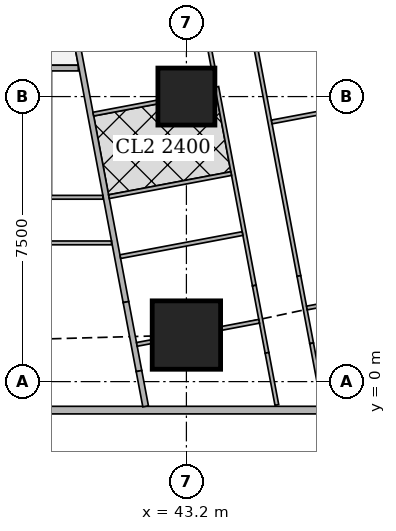
"""IFC4 building model, lengths in metres.
Left out: names, types, materials, properties, quantities, classifications, styles, units other than length and angle.
Written with IfcOpenShell. Run it as: python <this file> out.ifc"""

import sys

from ifc_helpers import new_model, si_unit, direction, frame, frame_2d, origin, origin_2d, place, context, subcontext, project, spatial, rectangle, extrude, element, fill, save


model = new_model("IFC4")
c1 = context("Model", 3, precision=1e-05, world=origin(), true_north=direction((0.0, 1.0)))
c2 = subcontext(c1, "Body", "Model", "MODEL_VIEW")
j1 = project(units=[si_unit("LENGTHUNIT", "METRE"), si_unit("PLANEANGLEUNIT", "RADIAN")], contexts=[c1])
p1 = place(None, origin())
s1 = spatial("IfcSite", under=j1, at=p1, CompositionType="ELEMENT")
p2 = place(p1, origin())
s2 = spatial("IfcBuilding", under=s1, at=p2, CompositionType="ELEMENT")
p3 = place(p2, frame((0.0, 0.0, 169.55)))
s3 = spatial("IfcBuildingStorey", under=s2, at=p3, CompositionType="ELEMENT", Elevation=169.55)
p4 = place(p3, frame((43.2, 1.225, 0.0), z_axis=(0.0, 0.0, 1.0), x_axis=(1.0, 0.0, 0.0)))
e1 = element("IfcColumn", 1, at=p4, inside=s3, PredefinedType="COLUMN", context=c2, shape_type="SweptSolid", body=[
    extrude(rectangle(XDim=1.8, YDim=1.8, at=origin_2d()), origin(), (0.0, 0.0, 1.0), 3.75),
])
p5 = place(p3, frame((43.2, 7.5, 0.0), z_axis=(0.0, 0.0, 1.0), x_axis=(1.0, 0.0, 0.0)))
e2 = element("IfcColumn", 2, at=p5, inside=s3, PredefinedType="COLUMN", context=c2, shape_type="SweptSolid", body=[
    extrude(rectangle(XDim=1.5, YDim=1.5, at=origin_2d()), origin(), (0.0, 0.0, 1.0), 3.75),
])
p6 = place(p3, frame((2.163, -0.75, 0.0), z_axis=(0.0, 0.0, 1.0), x_axis=(1.0, 0.0, 0.0)))
e3 = element("IfcWall", 3, at=p6, inside=s3, PredefinedType="SOLIDWALL", context=c2, shape_type="SweptSolid", body=[
    extrude(rectangle(XDim=45.628, YDim=0.2, at=frame_2d((22.814, 0.0))), origin(), (0.0, 0.0, 1.0), 3.5),
])
p7 = place(p6, frame((9.537, 0.0, 0.9)))
e4 = element("IfcOpeningElement", 4, at=p7, cuts=e3, PredefinedType="OPENING", context=c2, shape_type="SweptSolid", body=[
    extrude(rectangle(XDim=1.8, YDim=1.5, at=frame_2d((0.9, 0.75))), frame((0.0, 0.11, 0.0), z_axis=(0.0, -1.0, 0.0), x_axis=(1.0, 0.0, 0.0)), (0.0, 0.0, 1.0), 0.22),
])
p8 = place(p6, frame((13.137, 0.0, 0.9)))
e5 = element("IfcOpeningElement", 5, at=p8, cuts=e3, PredefinedType="OPENING", context=c2, shape_type="SweptSolid", body=[
    extrude(rectangle(XDim=1.8, YDim=1.5, at=frame_2d((0.9, 0.75))), frame((0.0, 0.11, 0.0), z_axis=(0.0, -1.0, 0.0), x_axis=(1.0, 0.0, 0.0)), (0.0, 0.0, 1.0), 0.22),
])
p9 = place(p6, frame((16.737, 0.0, 0.9)))
e6 = element("IfcOpeningElement", 6, at=p9, cuts=e3, PredefinedType="OPENING", context=c2, shape_type="SweptSolid", body=[
    extrude(rectangle(XDim=1.8, YDim=1.5, at=frame_2d((0.9, 0.75))), frame((0.0, 0.11, 0.0), z_axis=(0.0, -1.0, 0.0), x_axis=(1.0, 0.0, 0.0)), (0.0, 0.0, 1.0), 0.22),
])
p10 = place(p6, frame((20.337, 0.0, 0.9)))
e7 = element("IfcOpeningElement", 7, at=p10, cuts=e3, PredefinedType="OPENING", context=c2, shape_type="SweptSolid", body=[
    extrude(rectangle(XDim=1.8, YDim=1.5, at=frame_2d((0.9, 0.75))), frame((0.0, 0.11, 0.0), z_axis=(0.0, -1.0, 0.0), x_axis=(1.0, 0.0, 0.0)), (0.0, 0.0, 1.0), 0.22),
])
p11 = place(p6, frame((23.937, 0.0, 0.9)))
e8 = element("IfcOpeningElement", 8, at=p11, cuts=e3, PredefinedType="OPENING", context=c2, shape_type="SweptSolid", body=[
    extrude(rectangle(XDim=1.8, YDim=1.5, at=frame_2d((0.9, 0.75))), frame((0.0, 0.11, 0.0), z_axis=(0.0, -1.0, 0.0), x_axis=(1.0, 0.0, 0.0)), (0.0, 0.0, 1.0), 0.22),
])
p12 = place(p6, frame((27.537, 0.0, 0.9)))
e9 = element("IfcOpeningElement", 9, at=p12, cuts=e3, PredefinedType="OPENING", context=c2, shape_type="SweptSolid", body=[
    extrude(rectangle(XDim=1.8, YDim=1.5, at=frame_2d((0.9, 0.75))), frame((0.0, 0.11, 0.0), z_axis=(0.0, -1.0, 0.0), x_axis=(1.0, 0.0, 0.0)), (0.0, 0.0, 1.0), 0.22),
])
p13 = place(p6, frame((31.137, 0.0, 0.9)))
e10 = element("IfcOpeningElement", 10, at=p13, cuts=e3, PredefinedType="OPENING", context=c2, shape_type="SweptSolid", body=[
    extrude(rectangle(XDim=1.8, YDim=1.5, at=frame_2d((0.9, 0.75))), frame((0.0, 0.11, 0.0), z_axis=(0.0, -1.0, 0.0), x_axis=(1.0, 0.0, 0.0)), (0.0, 0.0, 1.0), 0.22),
])
p14 = place(p6, frame((34.737, 0.0, 0.9)))
e11 = element("IfcOpeningElement", 11, at=p14, cuts=e3, PredefinedType="OPENING", context=c2, shape_type="SweptSolid", body=[
    extrude(rectangle(XDim=1.8, YDim=1.5, at=frame_2d((0.9, 0.75))), frame((0.0, 0.11, 0.0), z_axis=(0.0, -1.0, 0.0), x_axis=(1.0, 0.0, 0.0)), (0.0, 0.0, 1.0), 0.22),
])
p15 = place(p3, frame((50.653, 2.703, 0.0), z_axis=(0.0, 0.0, 1.0), x_axis=(-0.185612026696, 0.982623109613, 0.0)))
e12 = element("IfcWall", 12, at=p15, inside=s3, PredefinedType="SOLIDWALL", context=c2, shape_type="SweptSolid", body=[
    extrude(rectangle(XDim=41.393, YDim=0.2, at=frame_2d((20.697, 0.0))), origin(), (0.0, 0.0, 1.0), 3.5),
])
p16 = place(p15, frame((1.633, 0.0, 0.9)))
e13 = element("IfcOpeningElement", 13, at=p16, cuts=e12, PredefinedType="OPENING", context=c2, shape_type="SweptSolid", body=[
    extrude(rectangle(XDim=1.8, YDim=1.5, at=frame_2d((0.9, 0.75))), frame((0.0, 0.11, 0.0), z_axis=(0.0, -1.0, 0.0), x_axis=(1.0, 0.0, 0.0)), (0.0, 0.0, 1.0), 0.22),
])
p17 = place(p15, frame((6.032, 0.0, 0.9)))
e14 = element("IfcOpeningElement", 14, at=p17, cuts=e12, PredefinedType="OPENING", context=c2, shape_type="SweptSolid", body=[
    extrude(rectangle(XDim=1.8, YDim=1.5, at=frame_2d((0.9, 0.75))), frame((0.0, 0.11, 0.0), z_axis=(0.0, -1.0, 0.0), x_axis=(1.0, 0.0, 0.0)), (0.0, 0.0, 1.0), 0.22),
])
p18 = place(p15, frame((9.848, 0.0, 0.9)))
e15 = element("IfcOpeningElement", 15, at=p18, cuts=e12, PredefinedType="OPENING", context=c2, shape_type="SweptSolid", body=[
    extrude(rectangle(XDim=1.8, YDim=1.5, at=frame_2d((0.9, 0.75))), frame((0.0, 0.11, 0.0), z_axis=(0.0, -1.0, 0.0), x_axis=(1.0, 0.0, 0.0)), (0.0, 0.0, 1.0), 0.22),
])
p19 = place(p15, frame((13.664, 0.0, 0.9)))
e16 = element("IfcOpeningElement", 16, at=p19, cuts=e12, PredefinedType="OPENING", context=c2, shape_type="SweptSolid", body=[
    extrude(rectangle(XDim=1.8, YDim=1.5, at=frame_2d((0.9, 0.75))), frame((0.0, 0.11, 0.0), z_axis=(0.0, -1.0, 0.0), x_axis=(1.0, 0.0, 0.0)), (0.0, 0.0, 1.0), 0.22),
])
p20 = place(p15, frame((17.481, 0.0, 0.9)))
e17 = element("IfcOpeningElement", 17, at=p20, cuts=e12, PredefinedType="OPENING", context=c2, shape_type="SweptSolid", body=[
    extrude(rectangle(XDim=1.8, YDim=1.5, at=frame_2d((0.9, 0.75))), frame((0.0, 0.11, 0.0), z_axis=(0.0, -1.0, 0.0), x_axis=(1.0, 0.0, 0.0)), (0.0, 0.0, 1.0), 0.22),
])
p21 = place(p15, frame((21.297, 0.0, 0.9)))
e18 = element("IfcOpeningElement", 18, at=p21, cuts=e12, PredefinedType="OPENING", context=c2, shape_type="SweptSolid", body=[
    extrude(rectangle(XDim=1.8, YDim=1.5, at=frame_2d((0.9, 0.75))), frame((0.0, 0.11, 0.0), z_axis=(0.0, -1.0, 0.0), x_axis=(1.0, 0.0, 0.0)), (0.0, 0.0, 1.0), 0.22),
])
p22 = place(p15, frame((25.113, 0.0, 0.9)))
e19 = element("IfcOpeningElement", 19, at=p22, cuts=e12, PredefinedType="OPENING", context=c2, shape_type="SweptSolid", body=[
    extrude(rectangle(XDim=1.8, YDim=1.5, at=frame_2d((0.9, 0.75))), frame((0.0, 0.11, 0.0), z_axis=(0.0, -1.0, 0.0), x_axis=(1.0, 0.0, 0.0)), (0.0, 0.0, 1.0), 0.22),
])
p23 = place(p15, frame((28.93, 0.0, 0.9)))
e20 = element("IfcOpeningElement", 20, at=p23, cuts=e12, PredefinedType="OPENING", context=c2, shape_type="SweptSolid", body=[
    extrude(rectangle(XDim=1.8, YDim=1.5, at=frame_2d((0.9, 0.75))), frame((0.0, 0.11, 0.0), z_axis=(0.0, -1.0, 0.0), x_axis=(1.0, 0.0, 0.0)), (0.0, 0.0, 1.0), 0.22),
])
p24 = place(p15, frame((32.746, 0.0, 0.9)))
e21 = element("IfcOpeningElement", 21, at=p24, cuts=e12, PredefinedType="OPENING", context=c2, shape_type="SweptSolid", body=[
    extrude(rectangle(XDim=1.8, YDim=1.5, at=frame_2d((0.9, 0.75))), frame((0.0, 0.11, 0.0), z_axis=(0.0, -1.0, 0.0), x_axis=(1.0, 0.0, 0.0)), (0.0, 0.0, 1.0), 0.22),
])
p25 = place(p15, frame((36.481, 0.0, 0.9)))
e22 = element("IfcOpeningElement", 22, at=p25, cuts=e12, PredefinedType="OPENING", context=c2, shape_type="SweptSolid", body=[
    extrude(rectangle(XDim=1.8, YDim=1.5, at=frame_2d((0.9, 0.75))), frame((0.0, 0.11, 0.0), z_axis=(0.0, -1.0, 0.0), x_axis=(1.0, 0.0, 0.0)), (0.0, 0.0, 1.0), 0.22),
])
p26 = place(p3, frame((40.356, 8.25, 0.0), z_axis=(0.0, 0.0, 1.0), x_axis=(-1.0, 0.0, 0.0)))
e23 = element("IfcWall", 23, at=p26, inside=s3, PredefinedType="SOLIDWALL", context=c2, shape_type="SweptSolid", body=[
    extrude(rectangle(XDim=3.605, YDim=0.15, at=frame_2d((1.802, 0.0))), origin(), (0.0, 0.0, 1.0), 3.5),
])
p27 = place(p3, frame((33.877, 43.029, 0.0), z_axis=(0.0, 0.0, 1.0), x_axis=(0.185596841028, -0.98262597798, 0.0)))
e24 = element("IfcWall", 24, at=p27, inside=s3, PredefinedType="SOLIDWALL", context=c2, shape_type="SweptSolid", body=[
    extrude(rectangle(XDim=41.66, YDim=0.15, at=frame_2d((20.83, 0.0))), origin(), (0.0, 0.0, 1.0), 2.5),
])
p28 = place(p27, frame((8.63, 0.0, 0.0)))
e25 = element("IfcOpeningElement", 25, at=p28, cuts=e24, PredefinedType="OPENING", context=c2, shape_type="SweptSolid", body=[
    extrude(rectangle(XDim=1.0, YDim=2.1, at=frame_2d((0.5, 1.05))), frame((0.0, 0.085, 0.0), z_axis=(0.0, -1.0, 0.0), x_axis=(1.0, 0.0, 0.0)), (0.0, 0.0, 1.0), 0.17),
])
p29 = place(p27, frame((13.841, 0.0, 0.0)))
e26 = element("IfcOpeningElement", 26, at=p29, cuts=e24, PredefinedType="OPENING", context=c2, shape_type="SweptSolid", body=[
    extrude(rectangle(XDim=1.0, YDim=2.1, at=frame_2d((0.5, 1.05))), frame((0.0, 0.085, 0.0), z_axis=(0.0, -1.0, 0.0), x_axis=(1.0, 0.0, 0.0)), (0.0, 0.0, 1.0), 0.17),
])
p30 = place(p27, frame((21.474, 0.0, 0.0)))
e27 = element("IfcOpeningElement", 27, at=p30, cuts=e24, PredefinedType="OPENING", context=c2, shape_type="SweptSolid", body=[
    extrude(rectangle(XDim=1.0, YDim=2.1, at=frame_2d((0.5, 1.05))), frame((0.0, 0.085, 0.0), z_axis=(0.0, -1.0, 0.0), x_axis=(1.0, 0.0, 0.0)), (0.0, 0.0, 1.0), 0.17),
])
p31 = place(p27, frame((30.4, 0.0, 0.0)))
e28 = element("IfcOpeningElement", 28, at=p31, cuts=e24, PredefinedType="OPENING", context=c2, shape_type="SweptSolid", body=[
    extrude(rectangle(XDim=1.0, YDim=2.1, at=frame_2d((0.5, 1.05))), frame((0.0, 0.085, 0.0), z_axis=(0.0, -1.0, 0.0), x_axis=(1.0, 0.0, 0.0)), (0.0, 0.0, 1.0), 0.17),
])
p32 = place(p27, frame((32.288, 0.0, 0.0)))
e29 = element("IfcOpeningElement", 29, at=p32, cuts=e24, PredefinedType="OPENING", context=c2, shape_type="SweptSolid", body=[
    extrude(rectangle(XDim=1.0, YDim=2.1, at=frame_2d((0.5, 1.05))), frame((0.0, 0.085, 0.0), z_axis=(0.0, -1.0, 0.0), x_axis=(1.0, 0.0, 0.0)), (0.0, 0.0, 1.0), 0.17),
])
p33 = place(p3, frame((41.609, 2.093, 0.0), z_axis=(0.0, 0.0, 1.0), x_axis=(0.185708872674, -0.982604811005, 0.0)))
e30 = element("IfcWall", 30, at=p33, inside=s3, PredefinedType="SOLIDWALL", context=c2, shape_type="SweptSolid", body=[
    extrude(rectangle(XDim=1.847, YDim=0.15, at=frame_2d((0.924, 0.0))), origin(), (0.0, 0.0, 1.0), 2.1),
])
p34 = place(p3, frame((41.952, 0.278, 0.0), z_axis=(0.0, 0.0, 1.0), x_axis=(0.185365466984, -0.982669651332, 0.0)))
e31 = element("IfcWall", 31, at=p34, inside=s3, PredefinedType="SOLIDWALL", context=c2, shape_type="SweptSolid", body=[
    extrude(rectangle(XDim=0.944, YDim=0.15, at=frame_2d((0.472, 0.0))), origin(), (0.0, 0.0, 1.0), 3.5),
])
p35 = place(p3, frame((41.229, 3.65, 0.0), z_axis=(0.0, 0.0, 1.0), x_axis=(-1.0, 0.0, 0.0)))
e32 = element("IfcWall", 32, at=p35, inside=s3, PredefinedType="PARTITIONING", context=c2, shape_type="SweptSolid", body=[
    extrude(rectangle(XDim=8.829, YDim=0.1, at=frame_2d((4.415, 0.0))), origin(), (0.0, 0.0, 1.0), 3.5),
])
p36 = place(p35, frame((6.53, 0.0, 0.0)))
e33 = element("IfcOpeningElement", 33, at=p36, cuts=e32, PredefinedType="OPENING", context=c2, shape_type="SweptSolid", body=[
    extrude(rectangle(XDim=0.9, YDim=2.1, at=frame_2d((0.45, 1.05))), frame((0.0, 0.06, 0.0), z_axis=(0.0, -1.0, 0.0), x_axis=(1.0, 0.0, 0.0)), (0.0, 0.0, 1.0), 0.12),
])
p37 = place(p35, frame((4.129, 0.0, 0.0)))
e34 = element("IfcOpeningElement", 34, at=p37, cuts=e32, PredefinedType="OPENING", context=c2, shape_type="SweptSolid", body=[
    extrude(rectangle(XDim=0.9, YDim=2.1, at=frame_2d((0.45, 1.05))), frame((0.0, 0.06, 0.0), z_axis=(0.0, -1.0, 0.0), x_axis=(1.0, 0.0, 0.0)), (0.0, 0.0, 1.0), 0.12),
])
p38 = place(p3, frame((41.002, 4.85, 0.0), z_axis=(0.0, 0.0, 1.0), x_axis=(-1.0, 0.0, 0.0)))
e35 = element("IfcWall", 35, at=p38, inside=s3, PredefinedType="PARTITIONING", context=c2, shape_type="SweptSolid", body=[
    extrude(rectangle(XDim=7.403, YDim=0.1, at=frame_2d((3.701, 0.0))), origin(), (0.0, 0.0, 1.0), 3.5),
])
p39 = place(p38, frame((5.753, 0.0, 0.0)))
e36 = element("IfcOpeningElement", 36, at=p39, cuts=e35, PredefinedType="OPENING", context=c2, shape_type="SweptSolid", body=[
    extrude(rectangle(XDim=0.9, YDim=2.1, at=frame_2d((0.45, 1.05))), frame((0.0, 0.06, 0.0), z_axis=(0.0, -1.0, 0.0), x_axis=(1.0, 0.0, 0.0)), (0.0, 0.0, 1.0), 0.12),
])
p40 = place(p38, frame((3.447, 0.0, 0.0)))
e37 = element("IfcOpeningElement", 37, at=p40, cuts=e35, PredefinedType="OPENING", context=c2, shape_type="SweptSolid", body=[
    extrude(rectangle(XDim=0.9, YDim=2.1, at=frame_2d((0.45, 1.05))), frame((0.0, 0.06, 0.0), z_axis=(0.0, -1.0, 0.0), x_axis=(1.0, 0.0, 0.0)), (0.0, 0.0, 1.0), 0.12),
])
p41 = place(p38, frame((0.15, 0.0, 0.0)))
e38 = element("IfcOpeningElement", 38, at=p41, cuts=e35, PredefinedType="OPENING", context=c2, shape_type="SweptSolid", body=[
    extrude(rectangle(XDim=0.9, YDim=2.1, at=frame_2d((0.45, 1.05))), frame((0.0, 0.06, 0.0), z_axis=(0.0, -1.0, 0.0), x_axis=(1.0, 0.0, 0.0)), (0.0, 0.0, 1.0), 0.12),
])
p42 = place(p38, frame((1.647, 0.0, 0.0)))
e39 = element("IfcOpeningElement", 39, at=p42, cuts=e35, PredefinedType="OPENING", context=c2, shape_type="SweptSolid", body=[
    extrude(rectangle(XDim=0.9, YDim=2.1, at=frame_2d((0.45, 1.05))), frame((0.0, 0.06, 0.0), z_axis=(0.0, -1.0, 0.0), x_axis=(1.0, 0.0, 0.0)), (0.0, 0.0, 1.0), 0.12),
])
p43 = place(p3, frame((44.727, 10.366, 0.0), z_axis=(0.0, 0.0, 1.0), x_axis=(0.185578957652, -0.982629355595, 0.0)))
e40 = element("IfcWall", 40, at=p43, inside=s3, PredefinedType="PARTITIONING", context=c2, shape_type="SweptSolid", body=[
    extrude(rectangle(XDim=7.721, YDim=0.1, at=frame_2d((3.86, 0.0))), origin(), (0.0, 0.0, 1.0), 3.5),
])
p44 = place(p43, frame((0.151, 0.0, 0.0)))
e41 = element("IfcOpeningElement", 41, at=p44, cuts=e40, PredefinedType="OPENING", context=c2, shape_type="SweptSolid", body=[
    extrude(rectangle(XDim=0.9, YDim=2.1, at=frame_2d((0.45, 1.05))), frame((0.0, 0.06, 0.0), z_axis=(0.0, -1.0, 0.0), x_axis=(1.0, 0.0, 0.0)), (0.0, 0.0, 1.0), 0.12),
])
p45 = place(p43, frame((3.806, 0.0, 0.0)))
e42 = element("IfcOpeningElement", 42, at=p45, cuts=e40, PredefinedType="OPENING", context=c2, shape_type="SweptSolid", body=[
    extrude(rectangle(XDim=0.9, YDim=2.1, at=frame_2d((0.45, 1.05))), frame((0.0, 0.06, 0.0), z_axis=(0.0, -1.0, 0.0), x_axis=(1.0, 0.0, 0.0)), (0.0, 0.0, 1.0), 0.12),
])
p46 = place(p3, frame((46.16, 2.779, 0.0), z_axis=(0.0, 0.0, 1.0), x_axis=(0.18597295662, -0.982554863306, 0.0)))
e43 = element("IfcWall", 43, at=p46, inside=s3, PredefinedType="PARTITIONING", context=c2, shape_type="SweptSolid", body=[
    extrude(rectangle(XDim=1.802, YDim=0.1, at=frame_2d((0.901, 0.0))), origin(), (0.0, 0.0, 1.0), 2.1),
])
p47 = place(p3, frame((46.495, 1.008, 0.0), z_axis=(0.0, 0.0, 1.0), x_axis=(0.185535059532, -0.982637645159, 0.0)))
e44 = element("IfcWall", 44, at=p47, inside=s3, PredefinedType="PARTITIONING", context=c2, shape_type="SweptSolid", body=[
    extrude(rectangle(XDim=1.644, YDim=0.1, at=frame_2d((0.822, 0.0))), origin(), (0.0, 0.0, 1.0), 3.5),
])
p48 = place(p3, frame((43.539, 10.192, 0.0), z_axis=(0.0, 0.0, 1.0), x_axis=(0.18564540894, -0.982616803306, 0.0)))
e45 = element("IfcWall", 45, at=p48, inside=s3, PredefinedType="PARTITIONING", context=c2, shape_type="SweptSolid", body=[
    extrude(rectangle(XDim=1.966, YDim=0.1, at=frame_2d((0.983, 0.0))), origin(), (0.0, 0.0, 1.0), 3.5),
])
p49 = place(p3, frame((43.999, 7.755, 0.0), z_axis=(0.0, 0.0, 1.0), x_axis=(0.185565904578, -0.982631820703, 0.0)))
e46 = element("IfcWall", 46, at=p49, inside=s3, PredefinedType="PARTITIONING", context=c2, shape_type="SweptSolid", body=[
    extrude(rectangle(XDim=5.319, YDim=0.1, at=frame_2d((2.66, 0.0))), origin(), (0.0, 0.0, 1.0), 3.5),
])
p50 = place(p49, frame((1.0, 0.0, 0.0)))
e47 = element("IfcOpeningElement", 47, at=p50, cuts=e46, PredefinedType="OPENING", context=c2, shape_type="SweptSolid", body=[
    extrude(rectangle(XDim=0.9, YDim=2.1, at=frame_2d((0.45, 1.05))), frame((0.0, 0.06, 0.0), z_axis=(0.0, -1.0, 0.0), x_axis=(1.0, 0.0, 0.0)), (0.0, 0.0, 1.0), 0.12),
])
p51 = place(p49, frame((4.269, 0.0, 0.0)))
e48 = element("IfcOpeningElement", 48, at=p51, cuts=e46, PredefinedType="OPENING", context=c2, shape_type="SweptSolid", body=[
    extrude(rectangle(XDim=0.9, YDim=2.1, at=frame_2d((0.45, 1.05))), frame((0.0, 0.06, 0.0), z_axis=(0.0, -1.0, 0.0), x_axis=(1.0, 0.0, 0.0)), (0.0, 0.0, 1.0), 0.12),
])
p52 = place(p49, frame((2.665, 0.0, 0.0)))
e49 = element("IfcOpeningElement", 49, at=p52, cuts=e46, PredefinedType="OPENING", context=c2, shape_type="SweptSolid", body=[
    extrude(rectangle(XDim=0.9, YDim=2.1, at=frame_2d((0.45, 1.05))), frame((0.0, 0.06, 0.0), z_axis=(0.0, -1.0, 0.0), x_axis=(1.0, 0.0, 0.0)), (0.0, 0.0, 1.0), 0.12),
])
p53 = place(p3, frame((44.986, 2.528, 0.0), z_axis=(0.0, 0.0, 1.0), x_axis=(0.18584218627, -0.982579605835, 0.0)))
e50 = element("IfcWall", 50, at=p53, inside=s3, PredefinedType="PARTITIONING", context=c2, shape_type="SweptSolid", body=[
    extrude(rectangle(XDim=1.802, YDim=0.1, at=frame_2d((0.901, 0.0))), origin(), (0.0, 0.0, 1.0), 2.1),
])
p54 = place(p3, frame((45.321, 0.757, 0.0), z_axis=(0.0, 0.0, 1.0), x_axis=(0.185640562635, -0.982617718904, 0.0)))
e51 = element("IfcWall", 51, at=p54, inside=s3, PredefinedType="PARTITIONING", context=c2, shape_type="SweptSolid", body=[
    extrude(rectangle(XDim=1.395, YDim=0.1, at=frame_2d((0.698, 0.0))), origin(), (0.0, 0.0, 1.0), 3.5),
])
p55 = place(p54, frame((0.15, 0.0, 0.0)))
e52 = element("IfcOpeningElement", 52, at=p55, cuts=e51, PredefinedType="OPENING", context=c2, shape_type="SweptSolid", body=[
    extrude(rectangle(XDim=0.9, YDim=2.1, at=frame_2d((0.45, 1.05))), frame((0.0, 0.06, 0.0), z_axis=(0.0, -1.0, 0.0), x_axis=(1.0, 0.0, 0.0)), (0.0, 0.0, 1.0), 0.12),
])
p56 = place(p3, frame((46.82, 7.091, 0.0), z_axis=(0.0, 0.0, 1.0), x_axis=(-0.982689853246, -0.185258339427, 0.0)))
e53 = element("IfcWall", 53, at=p56, inside=s3, PredefinedType="PARTITIONING", context=c2, shape_type="SweptSolid", body=[
    extrude(rectangle(XDim=1.398, YDim=0.1, at=frame_2d((0.699, 0.0))), origin(), (0.0, 0.0, 1.0), 3.5),
])
p57 = place(p3, frame((46.738, 2.006, 0.0), z_axis=(0.0, 0.0, 1.0), x_axis=(-0.982820466874, -0.184564161994, 0.0)))
e54 = element("IfcWall", 54, at=p57, inside=s3, PredefinedType="PARTITIONING", context=c2, shape_type="SweptSolid", body=[
    extrude(rectangle(XDim=0.374, YDim=0.1, at=frame_2d((0.187, 0.0))), origin(), (0.0, 0.0, 1.0), 2.1),
])
p58 = place(p3, frame((42.44, 7.357, 0.0), z_axis=(0.0, 0.0, 1.0), x_axis=(-0.982643094077, -0.185506198448, 0.0)))
e55 = element("IfcWall", 55, at=p58, inside=s3, PredefinedType="PARTITIONING", context=c2, shape_type="SweptSolid", body=[
    extrude(rectangle(XDim=1.719, YDim=0.1, at=frame_2d((0.859, 0.0))), origin(), (0.0, 0.0, 1.0), 3.5),
])
p59 = place(p3, frame((45.114, 1.587, 0.0), z_axis=(0.0, 0.0, 1.0), x_axis=(-0.982567886437, -0.185904138047, 0.0)))
e56 = element("IfcWall", 56, at=p59, inside=s3, PredefinedType="PARTITIONING", context=c2, shape_type="SweptSolid", body=[
    extrude(rectangle(XDim=1.022, YDim=0.1, at=frame_2d((0.511, 0.0))), origin(), (0.0, 0.0, 1.0), 2.1),
])
p60 = place(p3, frame((42.29, 1.053, 0.0), z_axis=(0.0, 0.0, 1.0), x_axis=(-0.982830800147, -0.184509127909, 0.0)))
e57 = element("IfcWall", 57, at=p60, inside=s3, PredefinedType="PARTITIONING", context=c2, shape_type="SweptSolid", body=[
    extrude(rectangle(XDim=0.401, YDim=0.1, at=frame_2d((0.2, 0.0))), origin(), (0.0, 0.0, 1.0), 2.1),
])
p61 = place(p3, frame((44.677, 3.896, 0.0), z_axis=(0.0, 0.0, 1.0), x_axis=(-0.982610347627, -0.185679575441, 0.0)))
e58 = element("IfcWall", 58, at=p61, inside=s3, PredefinedType="PARTITIONING", context=c2, shape_type="SweptSolid", body=[
    extrude(rectangle(XDim=3.274, YDim=0.1, at=frame_2d((1.637, 0.0))), origin(), (0.0, 0.0, 1.0), 3.5),
])
p62 = place(p3, frame((44.379, 5.474, 0.0), z_axis=(0.0, 0.0, 1.0), x_axis=(-0.982607026909, -0.185697147715, 0.0)))
e59 = element("IfcWall", 59, at=p62, inside=s3, PredefinedType="PARTITIONING", context=c2, shape_type="SweptSolid", body=[
    extrude(rectangle(XDim=3.275, YDim=0.1, at=frame_2d((1.637, 0.0))), origin(), (0.0, 0.0, 1.0), 3.5),
])
p63 = place(p41, origin())
e60 = element("IfcDoor", 60, at=p63, inside=s3, OperationType="SINGLE_SWING_RIGHT", PredefinedType="DOOR", context=c2, shape_type="SweptSolid", body=[
    extrude(rectangle(XDim=0.9, YDim=2.1, at=frame_2d((0.45, 1.05))), frame((0.0, 0.025, 0.0), z_axis=(0.0, -1.0, 0.0), x_axis=(1.0, 0.0, 0.0)), (0.0, 0.0, 1.0), 0.05),
])
fill(e38, e60)
p64 = place(p45, origin())
e61 = element("IfcDoor", 61, at=p64, inside=s3, OperationType="SINGLE_SWING_LEFT", PredefinedType="DOOR", context=c2, shape_type="SweptSolid", body=[
    extrude(rectangle(XDim=0.9, YDim=2.1, at=frame_2d((0.45, 1.05))), frame((0.0, 0.025, 0.0), z_axis=(0.0, -1.0, 0.0), x_axis=(1.0, 0.0, 0.0)), (0.0, 0.0, 1.0), 0.05),
])
fill(e42, e61)
p65 = place(p50, origin())
e62 = element("IfcDoor", 62, at=p65, inside=s3, OperationType="SINGLE_SWING_LEFT", PredefinedType="DOOR", context=c2, shape_type="SweptSolid", body=[
    extrude(rectangle(XDim=0.9, YDim=2.1, at=frame_2d((0.45, 1.05))), frame((0.0, 0.025, 0.0), z_axis=(0.0, -1.0, 0.0), x_axis=(1.0, 0.0, 0.0)), (0.0, 0.0, 1.0), 0.05),
])
fill(e47, e62)
p66 = place(p51, origin())
e63 = element("IfcDoor", 63, at=p66, inside=s3, OperationType="SINGLE_SWING_LEFT", PredefinedType="DOOR", context=c2, shape_type="SweptSolid", body=[
    extrude(rectangle(XDim=0.9, YDim=2.1, at=frame_2d((0.45, 1.05))), frame((0.0, 0.025, 0.0), z_axis=(0.0, -1.0, 0.0), x_axis=(1.0, 0.0, 0.0)), (0.0, 0.0, 1.0), 0.05),
])
fill(e48, e63)
p67 = place(p55, origin())
e64 = element("IfcDoor", 64, at=p67, inside=s3, OperationType="SINGLE_SWING_RIGHT", PredefinedType="DOOR", context=c2, shape_type="SweptSolid", body=[
    extrude(rectangle(XDim=0.9, YDim=2.1, at=frame_2d((0.45, 1.05))), frame((0.0, 0.025, 0.0), z_axis=(0.0, -1.0, 0.0), x_axis=(1.0, 0.0, 0.0)), (0.0, 0.0, 1.0), 0.05),
])
fill(e52, e64)
p68 = place(p52, origin())
e65 = element("IfcDoor", 65, at=p68, inside=s3, OperationType="SINGLE_SWING_LEFT", PredefinedType="DOOR", context=c2, shape_type="SweptSolid", body=[
    extrude(rectangle(XDim=0.9, YDim=2.1, at=frame_2d((0.45, 1.05))), frame((0.0, 0.025, 0.0), z_axis=(0.0, -1.0, 0.0), x_axis=(1.0, 0.0, 0.0)), (0.0, 0.0, 1.0), 0.05),
])
fill(e49, e65)
save(model, sys.argv[1])
